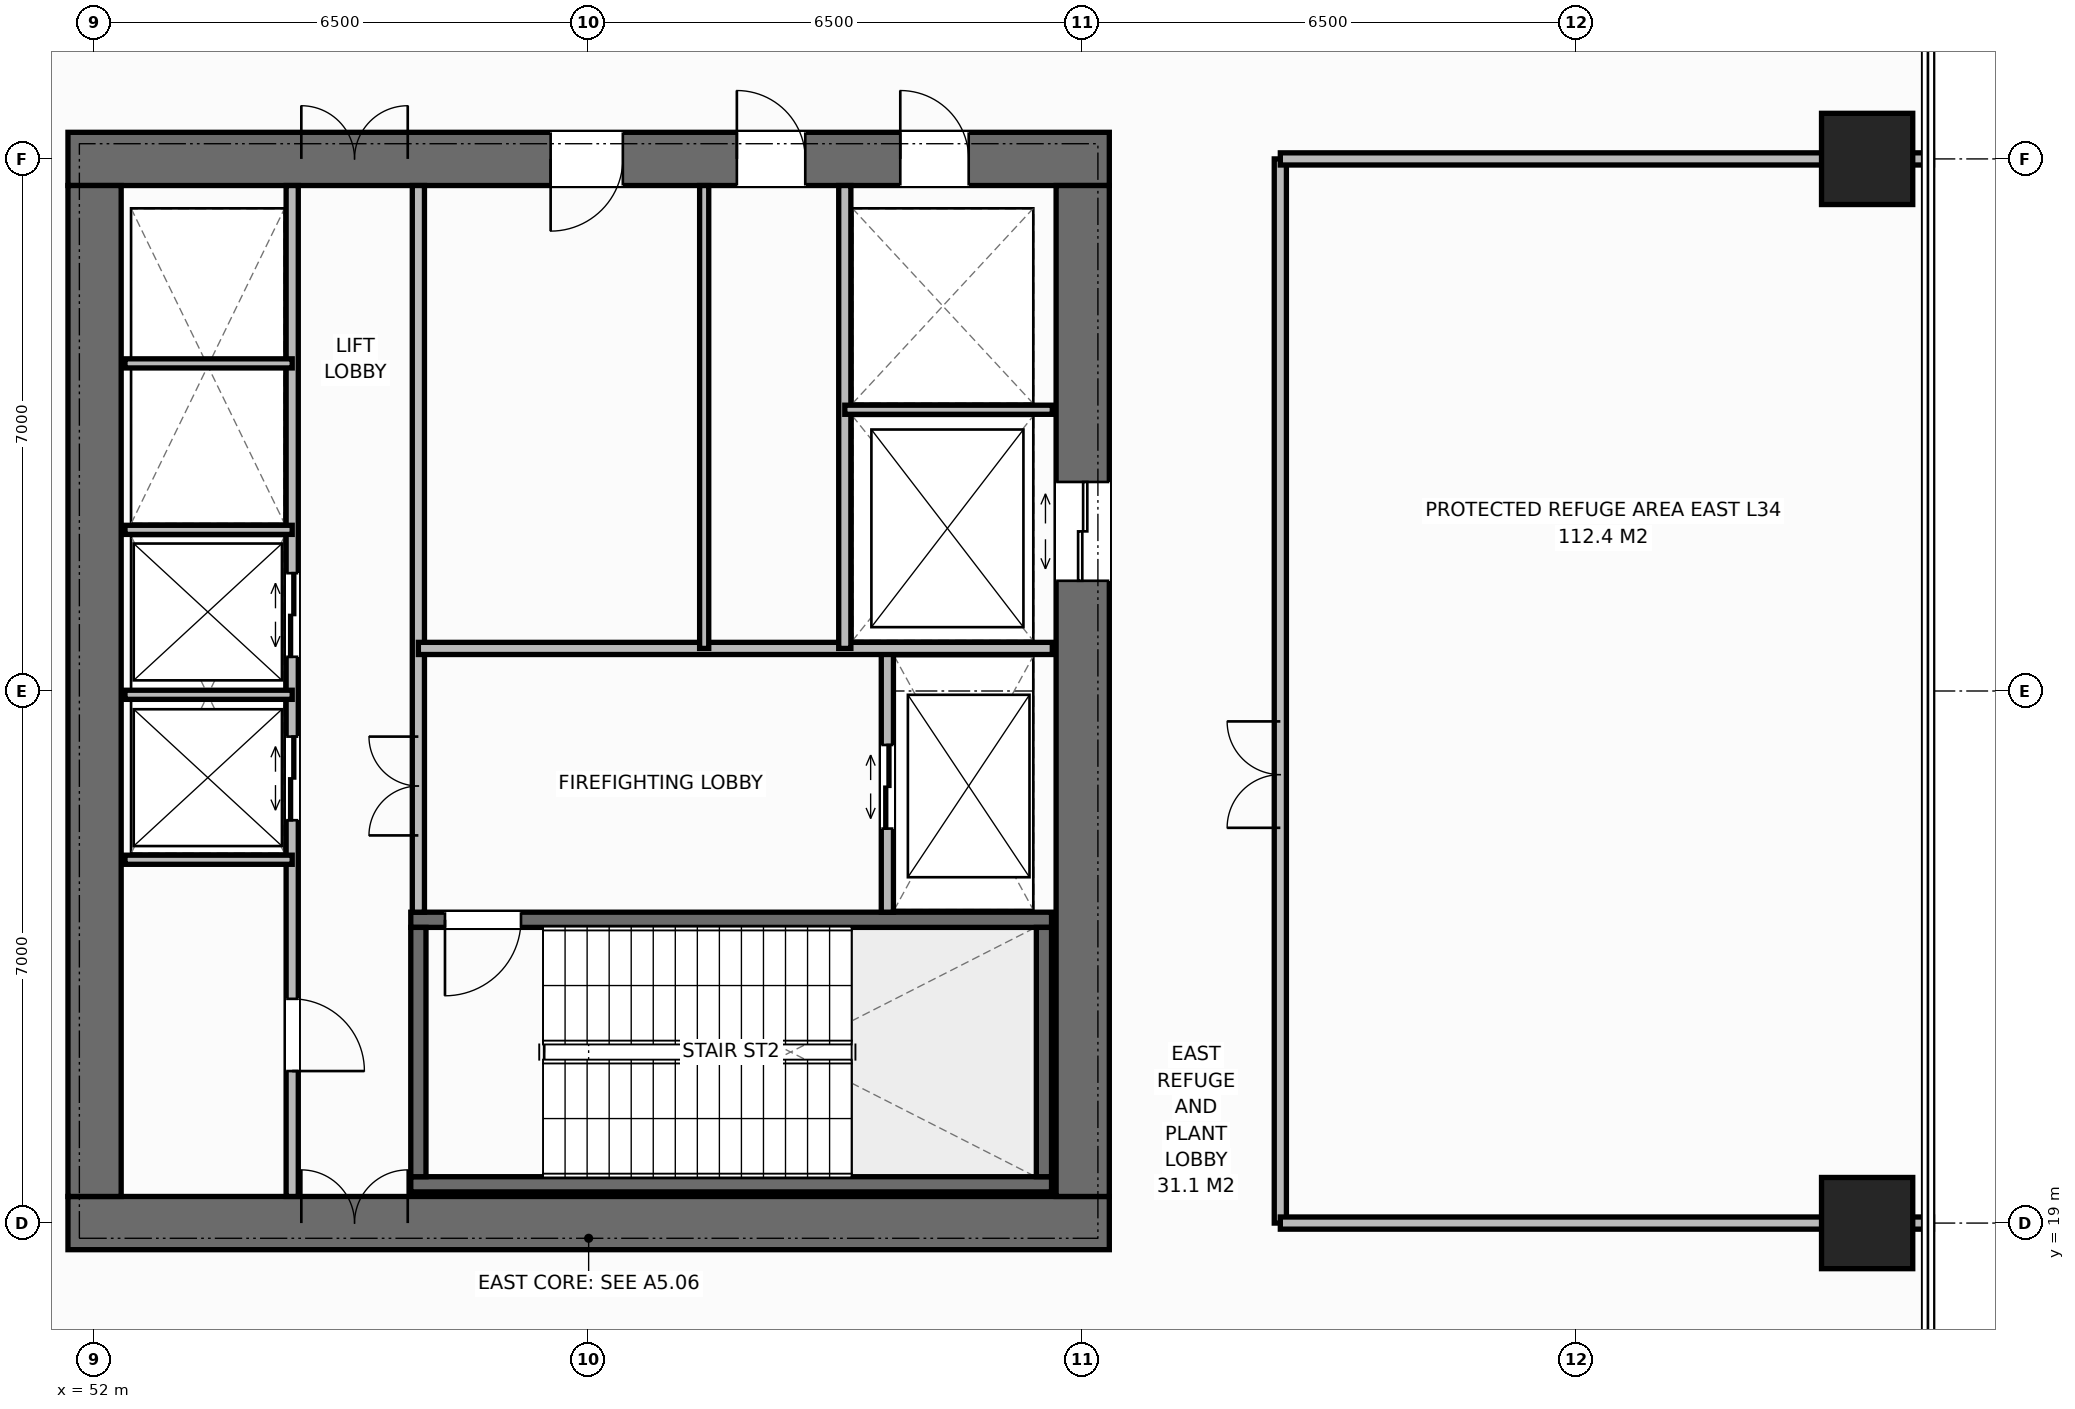
"""IFC4 building model, lengths in metres.
Left out: names, types, materials, properties, quantities, classifications, styles, units other than length and angle.
Written with IfcOpenShell. Run it as: python <this file> out.ifc"""

import sys

from ifc_helpers import new_model, si_unit, direction, frame, frame_2d, origin, origin_2d, place, context, subcontext, project, spatial, rectangle, extrude, element, fill, save


model = new_model("IFC4")
c1 = context("Model", 3, precision=1e-05, world=origin(), true_north=direction((0.0, 1.0)))
c2 = subcontext(c1, "Body", "Model", "MODEL_VIEW")
j1 = project(units=[si_unit("LENGTHUNIT", "METRE"), si_unit("PLANEANGLEUNIT", "RADIAN")], contexts=[c1])
p1 = place(None, origin())
s1 = spatial("IfcSite", under=j1, at=p1, CompositionType="ELEMENT")
p2 = place(p1, origin())
s2 = spatial("IfcBuilding", under=s1, at=p2, CompositionType="ELEMENT")
p3 = place(p2, frame((0.0, 0.0, 139.2)))
s3 = spatial("IfcBuildingStorey", under=s2, at=p3, CompositionType="ELEMENT", Elevation=139.2)
p4 = place(p3, frame((51.65, 19.0, 0.0), z_axis=(0.0, 0.0, 1.0), x_axis=(1.0, 0.0, 0.0)))
e1 = element("IfcWall", 1, at=p4, inside=s3, PredefinedType="SHEAR", context=c2, shape_type="SweptSolid", body=[
    extrude(rectangle(XDim=13.7, YDim=0.7, at=frame_2d((6.85, 0.0))), origin(), (0.0, 0.0, 1.0), 5.0),
])
p5 = place(p4, frame((3.07, 0.0, 0.0)))
e2 = element("IfcOpeningElement", 2, at=p5, cuts=e1, PredefinedType="OPENING", context=c2, shape_type="SweptSolid", body=[
    extrude(rectangle(XDim=1.4, YDim=2.2, at=frame_2d((0.7, 1.1))), frame((0.0, 0.36, 0.0), z_axis=(0.0, -1.0, 0.0), x_axis=(1.0, 0.0, 0.0)), (0.0, 0.0, 1.0), 0.72),
])
p6 = place(p3, frame((51.65, 33.0, 0.0), z_axis=(0.0, 0.0, 1.0), x_axis=(1.0, 0.0, 0.0)))
e3 = element("IfcWall", 3, at=p6, inside=s3, PredefinedType="SHEAR", context=c2, shape_type="SweptSolid", body=[
    extrude(rectangle(XDim=13.7, YDim=0.7, at=frame_2d((6.85, 0.0))), origin(), (0.0, 0.0, 1.0), 5.0),
])
p7 = place(p6, frame((3.07, 0.0, 0.0)))
e4 = element("IfcOpeningElement", 4, at=p7, cuts=e3, PredefinedType="OPENING", context=c2, shape_type="SweptSolid", body=[
    extrude(rectangle(XDim=1.4, YDim=2.2, at=frame_2d((0.7, 1.1))), frame((0.0, 0.36, 0.0), z_axis=(0.0, -1.0, 0.0), x_axis=(1.0, 0.0, 0.0)), (0.0, 0.0, 1.0), 0.72),
])
p8 = place(p6, frame((10.95, 0.0, 0.0)))
e5 = element("IfcOpeningElement", 5, at=p8, cuts=e3, PredefinedType="OPENING", context=c2, shape_type="SweptSolid", body=[
    extrude(rectangle(XDim=0.9, YDim=2.15, at=frame_2d((0.45, 1.075))), frame((0.0, 0.36, 0.0), z_axis=(0.0, -1.0, 0.0), x_axis=(1.0, 0.0, 0.0)), (0.0, 0.0, 1.0), 0.72),
])
p9 = place(p6, frame((6.35, 0.0, 0.0)))
e6 = element("IfcOpeningElement", 6, at=p9, cuts=e3, PredefinedType="OPENING", context=c2, shape_type="SweptSolid", body=[
    extrude(rectangle(XDim=0.95, YDim=2.15, at=frame_2d((0.475, 1.075))), frame((0.0, 0.36, 0.0), z_axis=(0.0, -1.0, 0.0), x_axis=(1.0, 0.0, 0.0)), (0.0, 0.0, 1.0), 0.72),
])
p10 = place(p6, frame((8.8, 0.0, 0.0)))
e7 = element("IfcOpeningElement", 7, at=p10, cuts=e3, PredefinedType="OPENING", context=c2, shape_type="SweptSolid", body=[
    extrude(rectangle(XDim=0.9, YDim=2.15, at=frame_2d((0.45, 1.075))), frame((0.0, 0.36, 0.0), z_axis=(0.0, -1.0, 0.0), x_axis=(1.0, 0.0, 0.0)), (0.0, 0.0, 1.0), 0.72),
])
p11 = place(p3, frame((52.0, 19.35, 0.0), z_axis=(0.0, 0.0, 1.0), x_axis=(0.0, 1.0, 0.0)))
e8 = element("IfcWall", 8, at=p11, inside=s3, PredefinedType="SHEAR", context=c2, shape_type="SweptSolid", body=[
    extrude(rectangle(XDim=13.3, YDim=0.7, at=frame_2d((6.65, 0.0))), origin(), (0.0, 0.0, 1.0), 5.0),
])
p12 = place(p3, frame((65.0, 19.35, 0.0), z_axis=(0.0, 0.0, 1.0), x_axis=(0.0, 1.0, 0.0)))
e9 = element("IfcWall", 9, at=p12, inside=s3, PredefinedType="SHEAR", context=c2, shape_type="SweptSolid", body=[
    extrude(rectangle(XDim=13.3, YDim=0.7, at=frame_2d((6.65, 0.0))), origin(), (0.0, 0.0, 1.0), 5.0),
])
p13 = place(p12, frame((8.1, 0.0, 0.0)))
e10 = element("IfcOpeningElement", 10, at=p13, cuts=e9, PredefinedType="OPENING", context=c2, shape_type="SweptSolid", body=[
    extrude(rectangle(XDim=1.3, YDim=2.2, at=frame_2d((0.65, 1.1))), frame((0.0, 0.36, 0.0), z_axis=(0.0, -1.0, 0.0), x_axis=(1.0, 0.0, 0.0)), (0.0, 0.0, 1.0), 0.72),
])
p14 = place(p3, frame((56.16, 19.51, 0.0), z_axis=(0.0, 0.0, 1.0), x_axis=(1.0, 0.0, 0.0)))
e11 = element("IfcWall", 11, at=p14, inside=s3, PredefinedType="SHEAR", context=c2, shape_type="SweptSolid", body=[
    extrude(rectangle(XDim=8.43, YDim=0.2, at=frame_2d((4.215, 0.0))), origin(), (0.0, 0.0, 1.0), 5.0),
])
p15 = place(p3, frame((56.16, 22.99, 0.0), z_axis=(0.0, 0.0, 1.0), x_axis=(1.0, 0.0, 0.0)))
e12 = element("IfcWall", 12, at=p15, inside=s3, PredefinedType="SHEAR", context=c2, shape_type="SweptSolid", body=[
    extrude(rectangle(XDim=8.43, YDim=0.2, at=frame_2d((4.215, 0.0))), origin(), (0.0, 0.0, 1.0), 5.0),
])
p16 = place(p15, frame((0.45, 0.0, 0.0)))
e13 = element("IfcOpeningElement", 13, at=p16, cuts=e12, PredefinedType="OPENING", context=c2, shape_type="SweptSolid", body=[
    extrude(rectangle(XDim=1.0, YDim=2.15, at=frame_2d((0.5, 1.075))), frame((0.0, 0.11, 0.0), z_axis=(0.0, -1.0, 0.0), x_axis=(1.0, 0.0, 0.0)), (0.0, 0.0, 1.0), 0.22),
])
for number, where, z_axis, x_axis in (
    (14, (56.26, 19.61, 0.0), (0.0, 0.0, 1.0), (0.0, 1.0, 0.0)),
    (15, (64.49, 19.61, 0.0), (0.0, 0.0, 1.0), (0.0, 1.0, 0.0)),
):
    element("IfcWall", number, at=place(p3, frame(where, z_axis=z_axis, x_axis=x_axis)), inside=s3, PredefinedType="SHEAR", context=c2, shape_type="SweptSolid", body=[
        extrude(rectangle(XDim=3.28, YDim=0.2, at=frame_2d((1.64, 0.0))), origin(), (0.0, 0.0, 1.0), 5.0),
    ])
for number, where, z_axis, x_axis in (
    (16, (75.32, 19.0, 0.0), (0.0, 0.0, 1.0), (1.0, 0.0, 0.0)),
    (17, (75.32, 33.0, 0.0), (0.0, 0.0, 1.0), (1.0, 0.0, 0.0)),
):
    element("IfcColumn", number, at=place(p3, frame(where, z_axis=z_axis, x_axis=x_axis)), inside=s3, PredefinedType="COLUMN", context=c2, shape_type="SweptSolid", body=[
        extrude(rectangle(XDim=1.2, YDim=1.2, at=origin_2d()), origin(), (0.0, 0.0, 1.0), 5.0),
    ])
p17 = place(p3, frame((54.6, 19.35, 0.0), z_axis=(0.0, 0.0, 1.0), x_axis=(0.0, 1.0, 0.0)))
e18 = element("IfcWall", 18, at=p17, inside=s3, PredefinedType="STANDARD", context=c2, shape_type="SweptSolid", body=[
    extrude(rectangle(XDim=13.3, YDim=0.16, at=frame_2d((6.65, 0.0))), origin(), (0.0, 0.0, 1.0), 4.772),
])
p18 = place(p17, frame((1.65, 0.0, 0.0)))
e19 = element("IfcOpeningElement", 19, at=p18, cuts=e18, PredefinedType="OPENING", context=c2, shape_type="SweptSolid", body=[
    extrude(rectangle(XDim=0.95, YDim=2.15, at=frame_2d((0.475, 1.075))), frame((0.0, 0.09, 0.0), z_axis=(0.0, -1.0, 0.0), x_axis=(1.0, 0.0, 0.0)), (0.0, 0.0, 1.0), 0.18),
])
p19 = place(p17, frame((4.95, 0.0, 0.0)))
e20 = element("IfcOpeningElement", 20, at=p19, cuts=e18, PredefinedType="OPENING", context=c2, shape_type="SweptSolid", body=[
    extrude(rectangle(XDim=1.1, YDim=2.2, at=frame_2d((0.55, 1.1))), frame((0.0, 0.09, 0.0), z_axis=(0.0, -1.0, 0.0), x_axis=(1.0, 0.0, 0.0)), (0.0, 0.0, 1.0), 0.18),
])
p20 = place(p17, frame((7.1, 0.0, 0.0)))
e21 = element("IfcOpeningElement", 21, at=p20, cuts=e18, PredefinedType="OPENING", context=c2, shape_type="SweptSolid", body=[
    extrude(rectangle(XDim=1.1, YDim=2.2, at=frame_2d((0.55, 1.1))), frame((0.0, 0.09, 0.0), z_axis=(0.0, -1.0, 0.0), x_axis=(1.0, 0.0, 0.0)), (0.0, 0.0, 1.0), 0.18),
])
p21 = place(p3, frame((56.26, 23.09, 0.0), z_axis=(0.0, 0.0, 1.0), x_axis=(0.0, 1.0, 0.0)))
e22 = element("IfcWall", 22, at=p21, inside=s3, PredefinedType="STANDARD", context=c2, shape_type="SweptSolid", body=[
    extrude(rectangle(XDim=9.56, YDim=0.16, at=frame_2d((4.78, 0.0))), origin(), (0.0, 0.0, 1.0), 4.772),
])
p22 = place(p21, frame((1.01, 0.0, 0.0)))
e23 = element("IfcOpeningElement", 23, at=p22, cuts=e22, PredefinedType="OPENING", context=c2, shape_type="SweptSolid", body=[
    extrude(rectangle(XDim=1.3, YDim=2.2, at=frame_2d((0.65, 1.1))), frame((0.0, 0.09, 0.0), z_axis=(0.0, -1.0, 0.0), x_axis=(1.0, 0.0, 0.0)), (0.0, 0.0, 1.0), 0.18),
])
for number, where, z_axis, x_axis in (
    (24, (52.4, 23.78, 0.0), (0.0, 0.0, 1.0), (1.0, 0.0, 0.0)),
    (25, (52.4, 25.95, 0.0), (0.0, 0.0, 1.0), (1.0, 0.0, 0.0)),
    (26, (52.4, 28.12, 0.0), (0.0, 0.0, 1.0), (1.0, 0.0, 0.0)),
    (27, (52.4, 30.31, 0.0), (0.0, 0.0, 1.0), (1.0, 0.0, 0.0)),
):
    element("IfcWall", number, at=place(p3, frame(where, z_axis=z_axis, x_axis=x_axis)), inside=s3, PredefinedType="PARTITIONING", context=c2, shape_type="SweptSolid", body=[
        extrude(rectangle(XDim=2.2, YDim=0.12, at=frame_2d((1.1, 0.0))), origin(), (0.0, 0.0, 1.0), 4.772),
    ])
p23 = place(p3, frame((62.43, 23.09, 0.0), z_axis=(0.0, 0.0, 1.0), x_axis=(0.0, 1.0, 0.0)))
e28 = element("IfcWall", 28, at=p23, inside=s3, PredefinedType="STANDARD", context=c2, shape_type="SweptSolid", body=[
    extrude(rectangle(XDim=3.47, YDim=0.16, at=frame_2d((1.735, 0.0))), origin(), (0.0, 0.0, 1.0), 4.772),
])
p24 = place(p23, frame((1.1, 0.0, 0.0)))
e29 = element("IfcOpeningElement", 29, at=p24, cuts=e28, PredefinedType="OPENING", context=c2, shape_type="SweptSolid", body=[
    extrude(rectangle(XDim=1.1, YDim=2.2, at=frame_2d((0.55, 1.1))), frame((0.0, 0.09, 0.0), z_axis=(0.0, -1.0, 0.0), x_axis=(1.0, 0.0, 0.0)), (0.0, 0.0, 1.0), 0.18),
])
p25 = place(p3, frame((56.26, 26.56, 0.0), z_axis=(0.0, 0.0, 1.0), x_axis=(1.0, 0.0, 0.0)))
e30 = element("IfcWall", 30, at=p25, inside=s3, PredefinedType="STANDARD", context=c2, shape_type="SweptSolid", body=[
    extrude(rectangle(XDim=8.34, YDim=0.16, at=frame_2d((4.17, 0.0))), origin(), (0.0, 0.0, 1.0), 4.772),
])
p26 = place(p3, frame((61.87, 26.56, 0.0), z_axis=(0.0, 0.0, 1.0), x_axis=(0.0, 1.0, 0.0)))
e31 = element("IfcWall", 31, at=p26, inside=s3, PredefinedType="STANDARD", context=c2, shape_type="SweptSolid", body=[
    extrude(rectangle(XDim=6.09, YDim=0.16, at=frame_2d((3.045, 0.0))), origin(), (0.0, 0.0, 1.0), 4.772),
])
p27 = place(p3, frame((61.87, 29.7, 0.0), z_axis=(0.0, 0.0, 1.0), x_axis=(1.0, 0.0, 0.0)))
e32 = element("IfcWall", 32, at=p27, inside=s3, PredefinedType="PARTITIONING", context=c2, shape_type="SweptSolid", body=[
    extrude(rectangle(XDim=2.73, YDim=0.12, at=frame_2d((1.365, 0.0))), origin(), (0.0, 0.0, 1.0), 4.772),
])
p28 = place(p3, frame((60.02, 26.56, 0.0), z_axis=(0.0, 0.0, 1.0), x_axis=(0.0, 1.0, 0.0)))
e33 = element("IfcWall", 33, at=p28, inside=s3, PredefinedType="PARTITIONING", context=c2, shape_type="SweptSolid", body=[
    extrude(rectangle(XDim=6.09, YDim=0.12, at=frame_2d((3.045, 0.0))), origin(), (0.0, 0.0, 1.0), 4.772),
])
p29 = place(p3, frame((67.6, 19.0, 0.0), z_axis=(0.0, 0.0, 1.0), x_axis=(0.0, 1.0, 0.0)))
e34 = element("IfcWall", 34, at=p29, inside=s3, PredefinedType="STANDARD", context=c2, shape_type="SweptSolid", body=[
    extrude(rectangle(XDim=14.0, YDim=0.16, at=frame_2d((7.0, 0.0))), origin(), (0.0, 0.0, 1.0), 4.772),
])
p30 = place(p29, frame((5.2, 0.0, 0.0)))
e35 = element("IfcOpeningElement", 35, at=p30, cuts=e34, PredefinedType="OPENING", context=c2, shape_type="SweptSolid", body=[
    extrude(rectangle(XDim=1.4, YDim=2.2, at=frame_2d((0.7, 1.1))), frame((0.0, 0.09, 0.0), z_axis=(0.0, -1.0, 0.0), x_axis=(1.0, 0.0, 0.0)), (0.0, 0.0, 1.0), 0.18),
])
for number, where, z_axis, x_axis in (
    (36, (67.6, 19.0, 0.0), (0.0, 0.0, 1.0), (1.0, 0.0, 0.0)),
    (37, (67.6, 33.0, 0.0), (0.0, 0.0, 1.0), (1.0, 0.0, 0.0)),
):
    element("IfcWall", number, at=place(p3, frame(where, z_axis=z_axis, x_axis=x_axis)), inside=s3, PredefinedType="STANDARD", context=c2, shape_type="SweptSolid", body=[
        extrude(rectangle(XDim=8.58, YDim=0.16, at=frame_2d((4.29, 0.0))), origin(), (0.0, 0.0, 1.0), 3.252),
    ])
p31 = place(p5, origin())
e38 = element("IfcDoor", 38, at=p31, inside=s3, OperationType="DOUBLE_DOOR_SINGLE_SWING", PredefinedType="DOOR", context=c2, shape_type="SweptSolid", body=[
    extrude(rectangle(XDim=1.4, YDim=2.2, at=frame_2d((0.7, 1.1))), frame((0.0, 0.125, 0.0), z_axis=(0.0, -1.0, 0.0), x_axis=(1.0, 0.0, 0.0)), (0.0, 0.0, 1.0), 0.05),
])
fill(e2, e38)
p32 = place(p7, origin())
e39 = element("IfcDoor", 39, at=p32, inside=s3, OperationType="DOUBLE_DOOR_SINGLE_SWING", PredefinedType="DOOR", context=c2, shape_type="SweptSolid", body=[
    extrude(rectangle(XDim=1.4, YDim=2.2, at=frame_2d((0.7, 1.1))), frame((0.0, -0.075, 0.0), z_axis=(0.0, -1.0, 0.0), x_axis=(1.0, 0.0, 0.0)), (0.0, 0.0, 1.0), 0.05),
])
fill(e4, e39)
p33 = place(p18, origin())
e40 = element("IfcDoor", 40, at=p33, inside=s3, OperationType="SINGLE_SWING_RIGHT", PredefinedType="DOOR", context=c2, shape_type="SweptSolid", body=[
    extrude(rectangle(XDim=0.95, YDim=2.15, at=frame_2d((0.475, 1.075))), frame((0.0, 0.025, 0.0), z_axis=(0.0, -1.0, 0.0), x_axis=(1.0, 0.0, 0.0)), (0.0, 0.0, 1.0), 0.05),
])
fill(e19, e40)
p34 = place(p19, origin())
e41 = element("IfcDoor", 41, at=p34, inside=s3, OperationType="DOUBLE_DOOR_SLIDING", PredefinedType="DOOR", context=c2, shape_type="SweptSolid", body=[
    extrude(rectangle(XDim=1.1, YDim=2.2, at=frame_2d((0.55, 1.1))), frame((0.0, 0.025, 0.0), z_axis=(0.0, -1.0, 0.0), x_axis=(1.0, 0.0, 0.0)), (0.0, 0.0, 1.0), 0.05),
])
fill(e20, e41)
p35 = place(p20, origin())
e42 = element("IfcDoor", 42, at=p35, inside=s3, OperationType="DOUBLE_DOOR_SLIDING", PredefinedType="DOOR", context=c2, shape_type="SweptSolid", body=[
    extrude(rectangle(XDim=1.1, YDim=2.2, at=frame_2d((0.55, 1.1))), frame((0.0, 0.025, 0.0), z_axis=(0.0, -1.0, 0.0), x_axis=(1.0, 0.0, 0.0)), (0.0, 0.0, 1.0), 0.05),
])
fill(e21, e42)
p36 = place(p16, origin())
e43 = element("IfcDoor", 43, at=p36, inside=s3, OperationType="SINGLE_SWING_RIGHT", PredefinedType="DOOR", context=c2, shape_type="SweptSolid", body=[
    extrude(rectangle(XDim=1.0, YDim=2.15, at=frame_2d((0.5, 1.075))), frame((0.0, 0.025, 0.0), z_axis=(0.0, -1.0, 0.0), x_axis=(1.0, 0.0, 0.0)), (0.0, 0.0, 1.0), 0.05),
])
fill(e13, e43)
p37 = place(p24, origin())
e44 = element("IfcDoor", 44, at=p37, inside=s3, OperationType="DOUBLE_DOOR_SLIDING", PredefinedType="DOOR", context=c2, shape_type="SweptSolid", body=[
    extrude(rectangle(XDim=1.1, YDim=2.2, at=frame_2d((0.55, 1.1))), frame((0.0, 0.025, 0.0), z_axis=(0.0, -1.0, 0.0), x_axis=(1.0, 0.0, 0.0)), (0.0, 0.0, 1.0), 0.05),
])
fill(e29, e44)
p38 = place(p22, origin())
e45 = element("IfcDoor", 45, at=p38, inside=s3, OperationType="DOUBLE_DOOR_SINGLE_SWING", PredefinedType="DOOR", context=c2, shape_type="SweptSolid", body=[
    extrude(rectangle(XDim=1.3, YDim=2.2, at=frame_2d((0.65, 1.1))), frame((0.0, 0.025, 0.0), z_axis=(0.0, -1.0, 0.0), x_axis=(1.0, 0.0, 0.0)), (0.0, 0.0, 1.0), 0.05),
])
fill(e23, e45)
p39 = place(p13, origin())
e46 = element("IfcDoor", 46, at=p39, inside=s3, OperationType="DOUBLE_DOOR_SLIDING", PredefinedType="DOOR", context=c2, shape_type="SweptSolid", body=[
    extrude(rectangle(XDim=1.3, YDim=2.2, at=frame_2d((0.65, 1.1))), frame((0.0, 0.025, 0.0), z_axis=(0.0, -1.0, 0.0), x_axis=(1.0, 0.0, 0.0)), (0.0, 0.0, 1.0), 0.05),
])
fill(e10, e46)
p40 = place(p8, origin())
e47 = element("IfcDoor", 47, at=p40, inside=s3, OperationType="SINGLE_SWING_LEFT", PredefinedType="DOOR", context=c2, shape_type="SweptSolid", body=[
    extrude(rectangle(XDim=0.9, YDim=2.15, at=frame_2d((0.45, 1.075))), frame((0.0, -0.075, 0.0), z_axis=(0.0, -1.0, 0.0), x_axis=(1.0, 0.0, 0.0)), (0.0, 0.0, 1.0), 0.05),
])
fill(e5, e47)
p41 = place(p9, origin())
e48 = element("IfcDoor", 48, at=p41, inside=s3, OperationType="SINGLE_SWING_RIGHT", PredefinedType="DOOR", context=c2, shape_type="SweptSolid", body=[
    extrude(rectangle(XDim=0.95, YDim=2.15, at=frame_2d((0.475, 1.075))), frame((0.0, -0.075, 0.0), z_axis=(0.0, -1.0, 0.0), x_axis=(1.0, 0.0, 0.0)), (0.0, 0.0, 1.0), 0.05),
])
fill(e6, e48)
p42 = place(p10, origin())
e49 = element("IfcDoor", 49, at=p42, inside=s3, OperationType="SINGLE_SWING_LEFT", PredefinedType="DOOR", context=c2, shape_type="SweptSolid", body=[
    extrude(rectangle(XDim=0.9, YDim=2.15, at=frame_2d((0.45, 1.075))), frame((0.0, -0.075, 0.0), z_axis=(0.0, -1.0, 0.0), x_axis=(1.0, 0.0, 0.0)), (0.0, 0.0, 1.0), 0.05),
])
fill(e7, e49)
p43 = place(p30, origin())
e50 = element("IfcDoor", 50, at=p43, inside=s3, OperationType="DOUBLE_DOOR_SINGLE_SWING", PredefinedType="DOOR", context=c2, shape_type="SweptSolid", body=[
    extrude(rectangle(XDim=1.4, YDim=2.2, at=frame_2d((0.7, 1.1))), frame((0.0, 0.025, 0.0), z_axis=(0.0, -1.0, 0.0), x_axis=(1.0, 0.0, 0.0)), (0.0, 0.0, 1.0), 0.05),
])
fill(e35, e50)
save(model, sys.argv[1])
